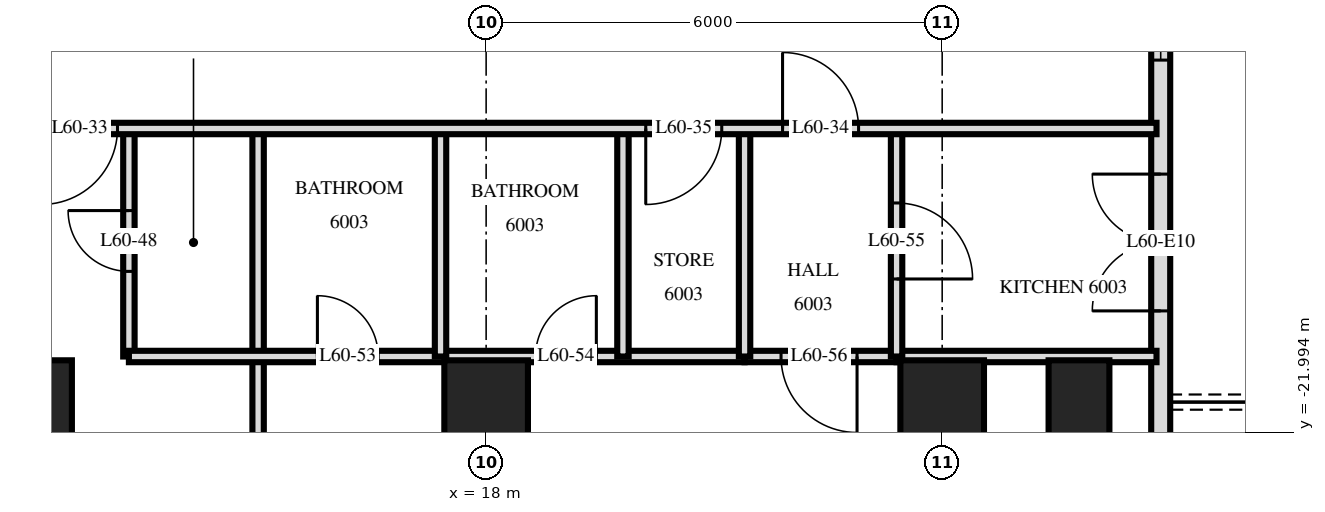
"""IFC4 building model, lengths in metres.
Left out: names, types, materials, properties, quantities, classifications, styles, units other than length and angle.
Written with IfcOpenShell. Run it as: python <this file> out.ifc"""

import sys

from ifc_helpers import new_model, si_unit, direction, frame, frame_2d, origin, origin_2d, place, context, subcontext, project, spatial, rectangle, extrude, element, fill, save


model = new_model("IFC4")
c1 = context("Model", 3, precision=1e-05, world=origin(), true_north=direction((0.0, 1.0)))
c2 = subcontext(c1, "Body", "Model", "MODEL_VIEW")
j1 = project(units=[si_unit("LENGTHUNIT", "METRE"), si_unit("PLANEANGLEUNIT", "RADIAN")], contexts=[c1])
p1 = place(None, origin())
s1 = spatial("IfcSite", under=j1, at=p1, CompositionType="ELEMENT")
p2 = place(p1, origin())
s2 = spatial("IfcBuilding", under=s1, at=p2, CompositionType="ELEMENT")
p3 = place(p2, frame((0.0, 0.0, 229.1)))
s3 = spatial("IfcBuildingStorey", under=s2, at=p3, CompositionType="ELEMENT", Elevation=229.1)
for number, where, z_axis, x_axis in (
    (1, (12.0, -21.6, 0.0), (0.0, 0.0, 1.0), (1.0, 0.0, 0.0)),
    (2, (18.0, -21.6, 0.0), (0.0, 0.0, 1.0), (1.0, 0.0, 0.0)),
    (3, (24.0, -21.6, 0.0), (0.0, 0.0, 1.0), (1.0, 0.0, 0.0)),
):
    element("IfcColumn", number, at=place(p3, frame(where, z_axis=z_axis, x_axis=x_axis)), inside=s3, PredefinedType="COLUMN", context=c2, shape_type="SweptSolid", body=[
        extrude(rectangle(XDim=1.1, YDim=1.1, at=origin_2d()), origin(), (0.0, 0.0, 1.0), 3.5),
    ])
p4 = place(p3, frame((25.8, -21.6, 0.0), z_axis=(0.0, 0.0, 1.0), x_axis=(0.0, 1.0, 0.0)))
e4 = element("IfcColumn", 4, at=p4, inside=s3, PredefinedType="COLUMN", context=c2, shape_type="SweptSolid", body=[
    extrude(rectangle(XDim=1.1, YDim=0.8, at=origin_2d()), origin(), (0.0, 0.0, 1.0), 3.5),
])
p5 = place(p3, frame((26.875, -24.875, 0.0), z_axis=(0.0, 0.0, 1.0), x_axis=(0.0, 1.0, 0.0)))
e5 = element("IfcWall", 5, at=p5, inside=s3, PredefinedType="SOLIDWALL", context=c2, shape_type="SweptSolid", body=[
    extrude(rectangle(XDim=21.551, YDim=0.25, at=frame_2d((10.775, 0.0))), origin(), (0.0, 0.0, 1.0), 3.22),
])
p6 = place(p5, frame((0.575, 0.0, 0.0)))
e6 = element("IfcOpeningElement", 6, at=p6, cuts=e5, PredefinedType="OPENING", context=c2, shape_type="SweptSolid", body=[
    extrude(rectangle(XDim=1.8, YDim=2.4, at=frame_2d((0.9, 1.2))), frame((0.0, 0.135, 0.0), z_axis=(0.0, -1.0, 0.0), x_axis=(1.0, 0.0, 0.0)), (0.0, 0.0, 1.0), 0.27),
])
p7 = place(p5, frame((4.475, 0.0, 0.0)))
e7 = element("IfcOpeningElement", 7, at=p7, cuts=e5, PredefinedType="OPENING", context=c2, shape_type="SweptSolid", body=[
    extrude(rectangle(XDim=1.8, YDim=2.4, at=frame_2d((0.9, 1.2))), frame((0.0, 0.135, 0.0), z_axis=(0.0, -1.0, 0.0), x_axis=(1.0, 0.0, 0.0)), (0.0, 0.0, 1.0), 0.27),
])
p8 = place(p5, frame((7.775, 0.0, 0.9)))
e8 = element("IfcOpeningElement", 8, at=p8, cuts=e5, PredefinedType="OPENING", context=c2, shape_type="SweptSolid", body=[
    extrude(rectangle(XDim=1.2, YDim=1.5, at=frame_2d((0.6, 0.75))), frame((0.0, 0.135, 0.0), z_axis=(0.0, -1.0, 0.0), x_axis=(1.0, 0.0, 0.0)), (0.0, 0.0, 1.0), 0.27),
])
p9 = place(p5, frame((13.1, 0.0, 0.0)))
e9 = element("IfcOpeningElement", 9, at=p9, cuts=e5, PredefinedType="OPENING", context=c2, shape_type="SweptSolid", body=[
    extrude(rectangle(XDim=1.8, YDim=2.4, at=frame_2d((0.9, 1.2))), frame((0.0, 0.135, 0.0), z_axis=(0.0, -1.0, 0.0), x_axis=(1.0, 0.0, 0.0)), (0.0, 0.0, 1.0), 0.27),
])
p10 = place(p3, frame((24.0, -28.918, 0.0), z_axis=(0.0, 0.0, 1.0), x_axis=(0.0, 1.0, 0.0)))
e10 = element("IfcWall", 10, at=p10, inside=s3, PredefinedType="PARTITIONING", context=c2, shape_type="SweptSolid", body=[
    extrude(rectangle(XDim=7.918, YDim=0.15, at=frame_2d((3.959, 0.0))), origin(), (0.0, 0.0, 1.0), 3.22),
])
p11 = place(p10, frame((3.398, 0.0, 0.0)))
e11 = element("IfcOpeningElement", 11, at=p11, cuts=e10, PredefinedType="OPENING", context=c2, shape_type="SweptSolid", body=[
    extrude(rectangle(XDim=0.9, YDim=2.1, at=frame_2d((0.45, 1.05))), frame((0.0, 0.085, 0.0), z_axis=(0.0, -1.0, 0.0), x_axis=(1.0, 0.0, 0.0)), (0.0, 0.0, 1.0), 0.17),
])
p12 = place(p3, frame((23.4, -21.0, 0.0), z_axis=(0.0, 0.0, 1.0), x_axis=(0.0, 1.0, 0.0)))
e12 = element("IfcWall", 12, at=p12, inside=s3, PredefinedType="PARTITIONING", context=c2, shape_type="SweptSolid", body=[
    extrude(rectangle(XDim=3.0, YDim=0.15, at=frame_2d((1.5, 0.0))), origin(), (0.0, 0.0, 1.0), 3.22),
])
p13 = place(p12, frame((1.02, 0.0, 0.0)))
e13 = element("IfcOpeningElement", 13, at=p13, cuts=e12, PredefinedType="OPENING", context=c2, shape_type="SweptSolid", body=[
    extrude(rectangle(XDim=1.0, YDim=2.1, at=frame_2d((0.5, 1.05))), frame((0.0, 0.085, 0.0), z_axis=(0.0, -1.0, 0.0), x_axis=(1.0, 0.0, 0.0)), (0.0, 0.0, 1.0), 0.17),
])
for number, where, z_axis, x_axis in (
    (14, (21.4, -21.0, 0.0), (0.0, 0.0, 1.0), (0.0, 1.0, 0.0)),
    (15, (19.8, -21.0, 0.0), (0.0, 0.0, 1.0), (0.0, 1.0, 0.0)),
):
    element("IfcWall", number, at=place(p3, frame(where, z_axis=z_axis, x_axis=x_axis)), inside=s3, PredefinedType="PARTITIONING", context=c2, shape_type="SweptSolid", body=[
        extrude(rectangle(XDim=3.0, YDim=0.15, at=frame_2d((1.5, 0.0))), origin(), (0.0, 0.0, 1.0), 3.22),
    ])
p14 = place(p3, frame((18.0, -29.22, 0.0), z_axis=(0.0, 0.0, 1.0), x_axis=(0.0, 1.0, 0.0)))
e16 = element("IfcWall", 16, at=p14, inside=s3, PredefinedType="PARTITIONING", context=c2, shape_type="SweptSolid", body=[
    extrude(rectangle(XDim=8.22, YDim=0.15, at=frame_2d((4.11, 0.0))), origin(), (0.0, 0.0, 1.0), 3.22),
])
p15 = place(p14, frame((3.59, 0.0, 0.0)))
e17 = element("IfcOpeningElement", 17, at=p15, cuts=e16, PredefinedType="OPENING", context=c2, shape_type="SweptSolid", body=[
    extrude(rectangle(XDim=0.9, YDim=2.1, at=frame_2d((0.45, 1.05))), frame((0.0, 0.085, 0.0), z_axis=(0.0, -1.0, 0.0), x_axis=(1.0, 0.0, 0.0)), (0.0, 0.0, 1.0), 0.17),
])
p16 = place(p3, frame((17.4, -21.0, 0.0), z_axis=(0.0, 0.0, 1.0), x_axis=(0.0, 1.0, 0.0)))
e18 = element("IfcWall", 18, at=p16, inside=s3, PredefinedType="PARTITIONING", context=c2, shape_type="SweptSolid", body=[
    extrude(rectangle(XDim=3.0, YDim=0.15, at=frame_2d((1.5, 0.0))), origin(), (0.0, 0.0, 1.0), 3.22),
])
p17 = place(p3, frame((15.0, -29.22, 0.0), z_axis=(0.0, 0.0, 1.0), x_axis=(0.0, 1.0, 0.0)))
e19 = element("IfcWall", 19, at=p17, inside=s3, PredefinedType="PARTITIONING", context=c2, shape_type="SweptSolid", body=[
    extrude(rectangle(XDim=11.22, YDim=0.15, at=frame_2d((5.61, 0.0))), origin(), (0.0, 0.0, 1.0), 3.22),
])
p18 = place(p3, frame((13.3, -21.0, 0.0), z_axis=(0.0, 0.0, 1.0), x_axis=(0.0, 1.0, 0.0)))
e20 = element("IfcWall", 20, at=p18, inside=s3, PredefinedType="PARTITIONING", context=c2, shape_type="SweptSolid", body=[
    extrude(rectangle(XDim=3.0, YDim=0.15, at=frame_2d((1.5, 0.0))), origin(), (0.0, 0.0, 1.0), 3.22),
])
p19 = place(p18, frame((1.12, 0.0, 0.0)))
e21 = element("IfcOpeningElement", 21, at=p19, cuts=e20, PredefinedType="OPENING", context=c2, shape_type="SweptSolid", body=[
    extrude(rectangle(XDim=0.8, YDim=2.1, at=frame_2d((0.4, 1.05))), frame((0.0, 0.085, 0.0), z_axis=(0.0, -1.0, 0.0), x_axis=(1.0, 0.0, 0.0)), (0.0, 0.0, 1.0), 0.17),
])
p20 = place(p3, frame((21.4, -21.0, 0.0), z_axis=(0.0, 0.0, 1.0), x_axis=(1.0, 0.0, 0.0)))
e22 = element("IfcWall", 22, at=p20, inside=s3, PredefinedType="PARTITIONING", context=c2, shape_type="SweptSolid", body=[
    extrude(rectangle(XDim=2.0, YDim=0.15, at=frame_2d((1.0, 0.0))), origin(), (0.0, 0.0, 1.0), 3.22),
])
p21 = place(p20, frame((0.48, 0.0, 0.0)))
e23 = element("IfcOpeningElement", 23, at=p21, cuts=e22, PredefinedType="OPENING", context=c2, shape_type="SweptSolid", body=[
    extrude(rectangle(XDim=1.0, YDim=2.1, at=frame_2d((0.5, 1.05))), frame((0.0, 0.085, 0.0), z_axis=(0.0, -1.0, 0.0), x_axis=(1.0, 0.0, 0.0)), (0.0, 0.0, 1.0), 0.17),
])
p22 = place(p3, frame((13.3, -21.0, 0.0), z_axis=(0.0, 0.0, 1.0), x_axis=(1.0, 0.0, 0.0)))
e24 = element("IfcWall", 24, at=p22, inside=s3, PredefinedType="PARTITIONING", context=c2, shape_type="SweptSolid", body=[
    extrude(rectangle(XDim=8.1, YDim=0.15, at=frame_2d((4.05, 0.0))), origin(), (0.0, 0.0, 1.0), 3.22),
])
p23 = place(p22, frame((2.48, 0.0, 0.0)))
e25 = element("IfcOpeningElement", 25, at=p23, cuts=e24, PredefinedType="OPENING", context=c2, shape_type="SweptSolid", body=[
    extrude(rectangle(XDim=0.8, YDim=2.1, at=frame_2d((0.4, 1.05))), frame((0.0, 0.085, 0.0), z_axis=(0.0, -1.0, 0.0), x_axis=(1.0, 0.0, 0.0)), (0.0, 0.0, 1.0), 0.17),
])
p24 = place(p22, frame((5.35, 0.0, 0.0)))
e26 = element("IfcOpeningElement", 26, at=p24, cuts=e24, PredefinedType="OPENING", context=c2, shape_type="SweptSolid", body=[
    extrude(rectangle(XDim=0.8, YDim=2.1, at=frame_2d((0.4, 1.05))), frame((0.0, 0.085, 0.0), z_axis=(0.0, -1.0, 0.0), x_axis=(1.0, 0.0, 0.0)), (0.0, 0.0, 1.0), 0.17),
])
p25 = place(p3, frame((23.4, -21.0, 0.0), z_axis=(0.0, 0.0, 1.0), x_axis=(1.0, 0.0, 0.0)))
e27 = element("IfcWall", 27, at=p25, inside=s3, PredefinedType="PARTITIONING", context=c2, shape_type="SweptSolid", body=[
    extrude(rectangle(XDim=3.42, YDim=0.15, at=frame_2d((1.71, 0.0))), origin(), (0.0, 0.0, 1.0), 3.22),
])
p26 = place(p3, frame((-26.82, -18.0, 0.0), z_axis=(0.0, 0.0, 1.0), x_axis=(1.0, 0.0, 0.0)))
e28 = element("IfcWall", 28, at=p26, inside=s3, PredefinedType="PARTITIONING", context=c2, shape_type="SweptSolid", body=[
    extrude(rectangle(XDim=53.64, YDim=0.15, at=frame_2d((26.82, 0.0))), origin(), (0.0, 0.0, 1.0), 3.22),
])
p27 = place(p26, frame((11.32, 0.0, 0.0)))
e29 = element("IfcOpeningElement", 29, at=p27, cuts=e28, PredefinedType="OPENING", context=c2, shape_type="SweptSolid", body=[
    extrude(rectangle(XDim=1.0, YDim=2.1, at=frame_2d((0.5, 1.05))), frame((0.0, 0.085, 0.0), z_axis=(0.0, -1.0, 0.0), x_axis=(1.0, 0.0, 0.0)), (0.0, 0.0, 1.0), 0.17),
])
p28 = place(p26, frame((3.22, 0.0, 0.0)))
e30 = element("IfcOpeningElement", 30, at=p28, cuts=e28, PredefinedType="OPENING", context=c2, shape_type="SweptSolid", body=[
    extrude(rectangle(XDim=1.0, YDim=2.1, at=frame_2d((0.5, 1.05))), frame((0.0, 0.085, 0.0), z_axis=(0.0, -1.0, 0.0), x_axis=(1.0, 0.0, 0.0)), (0.0, 0.0, 1.0), 0.17),
])
p29 = place(p26, frame((5.02, 0.0, 0.0)))
e31 = element("IfcOpeningElement", 31, at=p29, cuts=e28, PredefinedType="OPENING", context=c2, shape_type="SweptSolid", body=[
    extrude(rectangle(XDim=1.0, YDim=2.1, at=frame_2d((0.5, 1.05))), frame((0.0, 0.085, 0.0), z_axis=(0.0, -1.0, 0.0), x_axis=(1.0, 0.0, 0.0)), (0.0, 0.0, 1.0), 0.17),
])
p30 = place(p26, frame((38.97, 0.0, 0.0)))
e32 = element("IfcOpeningElement", 32, at=p30, cuts=e28, PredefinedType="OPENING", context=c2, shape_type="SweptSolid", body=[
    extrude(rectangle(XDim=1.0, YDim=2.1, at=frame_2d((0.5, 1.05))), frame((0.0, 0.085, 0.0), z_axis=(0.0, -1.0, 0.0), x_axis=(1.0, 0.0, 0.0)), (0.0, 0.0, 1.0), 0.17),
])
p31 = place(p26, frame((48.72, 0.0, 0.0)))
e33 = element("IfcOpeningElement", 33, at=p31, cuts=e28, PredefinedType="OPENING", context=c2, shape_type="SweptSolid", body=[
    extrude(rectangle(XDim=1.0, YDim=2.1, at=frame_2d((0.5, 1.05))), frame((0.0, 0.085, 0.0), z_axis=(0.0, -1.0, 0.0), x_axis=(1.0, 0.0, 0.0)), (0.0, 0.0, 1.0), 0.17),
])
p32 = place(p26, frame((46.92, 0.0, 0.0)))
e34 = element("IfcOpeningElement", 34, at=p32, cuts=e28, PredefinedType="OPENING", context=c2, shape_type="SweptSolid", body=[
    extrude(rectangle(XDim=1.0, YDim=2.1, at=frame_2d((0.5, 1.05))), frame((0.0, 0.085, 0.0), z_axis=(0.0, -1.0, 0.0), x_axis=(1.0, 0.0, 0.0)), (0.0, 0.0, 1.0), 0.17),
])
p33 = place(p26, frame((18.82, 0.0, 0.0)))
e35 = element("IfcOpeningElement", 35, at=p33, cuts=e28, PredefinedType="OPENING", context=c2, shape_type="SweptSolid", body=[
    extrude(rectangle(XDim=1.0, YDim=2.1, at=frame_2d((0.5, 1.05))), frame((0.0, 0.085, 0.0), z_axis=(0.0, -1.0, 0.0), x_axis=(1.0, 0.0, 0.0)), (0.0, 0.0, 1.0), 0.17),
])
p34 = place(p26, frame((27.82, 0.0, 0.0)))
e36 = element("IfcOpeningElement", 36, at=p34, cuts=e28, PredefinedType="OPENING", context=c2, shape_type="SweptSolid", body=[
    extrude(rectangle(XDim=1.0, YDim=2.1, at=frame_2d((0.5, 1.05))), frame((0.0, 0.085, 0.0), z_axis=(0.0, -1.0, 0.0), x_axis=(1.0, 0.0, 0.0)), (0.0, 0.0, 1.0), 0.17),
])
p35 = place(p26, frame((35.32, 0.0, 0.0)))
e37 = element("IfcOpeningElement", 37, at=p35, cuts=e28, PredefinedType="OPENING", context=c2, shape_type="SweptSolid", body=[
    extrude(rectangle(XDim=1.0, YDim=2.1, at=frame_2d((0.5, 1.05))), frame((0.0, 0.085, 0.0), z_axis=(0.0, -1.0, 0.0), x_axis=(1.0, 0.0, 0.0)), (0.0, 0.0, 1.0), 0.17),
])
p36 = place(p7, origin())
e38 = element("IfcDoor", 38, at=p36, inside=s3, OperationType="DOUBLE_DOOR_SINGLE_SWING", PredefinedType="DOOR", context=c2, shape_type="SweptSolid", body=[
    extrude(rectangle(XDim=1.8, YDim=2.4, at=frame_2d((0.9, 1.2))), frame((0.0, 0.025, 0.0), z_axis=(0.0, -1.0, 0.0), x_axis=(1.0, 0.0, 0.0)), (0.0, 0.0, 1.0), 0.05),
])
fill(e7, e38)
p37 = place(p8, origin())
e39 = element("IfcWindow", 39, at=p37, inside=s3, PartitioningType="SINGLE_PANEL", PredefinedType="WINDOW", context=c2, shape_type="SweptSolid", body=[
    extrude(rectangle(XDim=1.2, YDim=1.5, at=frame_2d((0.6, 0.75))), frame((0.0, 0.03, 0.0), z_axis=(0.0, -1.0, 0.0), x_axis=(1.0, 0.0, 0.0)), (0.0, 0.0, 1.0), 0.06),
])
fill(e8, e39)
p38 = place(p30, frame((0.5, 0.0, 0.0), z_axis=(0.0, 0.0, 1.0), x_axis=(-1.0, 0.0, 0.0)))
e40 = element("IfcDoor", 40, at=p38, inside=s3, OperationType="SINGLE_SWING_LEFT", PredefinedType="DOOR", context=c2, shape_type="SweptSolid", body=[
    extrude(rectangle(XDim=1.0, YDim=2.1, at=frame_2d((0.0, 1.05))), frame((0.0, -0.025, 0.0), z_axis=(0.0, 1.0, 0.0), x_axis=(-1.0, 0.0, 0.0)), (0.0, 0.0, 1.0), 0.05),
])
fill(e32, e40)
p39 = place(p31, origin())
e41 = element("IfcDoor", 41, at=p39, inside=s3, OperationType="SINGLE_SWING_RIGHT", PredefinedType="DOOR", context=c2, shape_type="SweptSolid", body=[
    extrude(rectangle(XDim=1.0, YDim=2.1, at=frame_2d((0.5, 1.05))), frame((0.0, 0.025, 0.0), z_axis=(0.0, -1.0, 0.0), x_axis=(1.0, 0.0, 0.0)), (0.0, 0.0, 1.0), 0.05),
])
fill(e33, e41)
p40 = place(p32, frame((0.5, 0.0, 0.0), z_axis=(0.0, 0.0, 1.0), x_axis=(-1.0, 0.0, 0.0)))
e42 = element("IfcDoor", 42, at=p40, inside=s3, OperationType="SINGLE_SWING_LEFT", PredefinedType="DOOR", context=c2, shape_type="SweptSolid", body=[
    extrude(rectangle(XDim=1.0, YDim=2.1, at=frame_2d((0.0, 1.05))), frame((0.0, -0.025, 0.0), z_axis=(0.0, 1.0, 0.0), x_axis=(-1.0, 0.0, 0.0)), (0.0, 0.0, 1.0), 0.05),
])
fill(e34, e42)
p41 = place(p19, origin())
e43 = element("IfcDoor", 43, at=p41, inside=s3, OperationType="SINGLE_SWING_LEFT", PredefinedType="DOOR", context=c2, shape_type="SweptSolid", body=[
    extrude(rectangle(XDim=0.8, YDim=2.1, at=frame_2d((0.4, 1.05))), frame((0.0, 0.025, 0.0), z_axis=(0.0, -1.0, 0.0), x_axis=(1.0, 0.0, 0.0)), (0.0, 0.0, 1.0), 0.05),
])
fill(e21, e43)
p42 = place(p23, origin())
e44 = element("IfcDoor", 44, at=p42, inside=s3, OperationType="SINGLE_SWING_RIGHT", PredefinedType="DOOR", context=c2, shape_type="SweptSolid", body=[
    extrude(rectangle(XDim=0.8, YDim=2.1, at=frame_2d((0.4, 1.05))), frame((0.0, 0.025, 0.0), z_axis=(0.0, -1.0, 0.0), x_axis=(1.0, 0.0, 0.0)), (0.0, 0.0, 1.0), 0.05),
])
fill(e25, e44)
p43 = place(p24, origin())
e45 = element("IfcDoor", 45, at=p43, inside=s3, OperationType="SINGLE_SWING_LEFT", PredefinedType="DOOR", context=c2, shape_type="SweptSolid", body=[
    extrude(rectangle(XDim=0.8, YDim=2.1, at=frame_2d((0.4, 1.05))), frame((0.0, 0.025, 0.0), z_axis=(0.0, -1.0, 0.0), x_axis=(1.0, 0.0, 0.0)), (0.0, 0.0, 1.0), 0.05),
])
fill(e26, e45)
p44 = place(p13, frame((0.5, 0.0, 0.0), z_axis=(0.0, 0.0, 1.0), x_axis=(-1.0, 0.0, 0.0)))
e46 = element("IfcDoor", 46, at=p44, inside=s3, OperationType="SINGLE_SWING_LEFT", PredefinedType="DOOR", context=c2, shape_type="SweptSolid", body=[
    extrude(rectangle(XDim=1.0, YDim=2.1, at=frame_2d((0.0, 1.05))), frame((0.0, -0.025, 0.0), z_axis=(0.0, 1.0, 0.0), x_axis=(-1.0, 0.0, 0.0)), (0.0, 0.0, 1.0), 0.05),
])
fill(e13, e46)
p45 = place(p21, frame((0.5, 0.0, 0.0), z_axis=(0.0, 0.0, 1.0), x_axis=(-1.0, 0.0, 0.0)))
e47 = element("IfcDoor", 47, at=p45, inside=s3, OperationType="SINGLE_SWING_RIGHT", PredefinedType="DOOR", context=c2, shape_type="SweptSolid", body=[
    extrude(rectangle(XDim=1.0, YDim=2.1, at=frame_2d((0.0, 1.05))), frame((0.0, -0.025, 0.0), z_axis=(0.0, 1.0, 0.0), x_axis=(-1.0, 0.0, 0.0)), (0.0, 0.0, 1.0), 0.05),
])
fill(e23, e47)
save(model, sys.argv[1])
